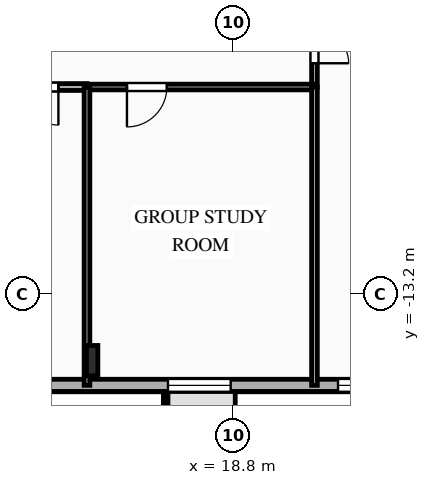
"""IFC4 building model, lengths in metres.
Left out: names, types, materials, properties, quantities, classifications, styles, units other than length and angle.
Written with IfcOpenShell. Run it as: python <this file> out.ifc"""

import sys

from ifc_helpers import new_model, si_unit, direction, frame, frame_2d, origin, origin_2d, place, context, subcontext, project, spatial, rectangle, i_section, extrude, element, fill, save


model = new_model("IFC4")
c1 = context("Model", 3, precision=1e-05, world=origin(), true_north=direction((0.0, 1.0)))
c2 = subcontext(c1, "Body", "Model", "MODEL_VIEW")
j1 = project(units=[si_unit("LENGTHUNIT", "METRE"), si_unit("PLANEANGLEUNIT", "RADIAN")], contexts=[c1])
p1 = place(None, origin())
s1 = spatial("IfcSite", under=j1, at=p1, CompositionType="ELEMENT")
p2 = place(p1, origin())
s2 = spatial("IfcBuilding", under=s1, at=p2, CompositionType="ELEMENT")
p3 = place(p2, frame((0.0, 0.0, 154.45)))
s3 = spatial("IfcBuildingStorey", under=s2, at=p3, CompositionType="ELEMENT", Elevation=154.45)
p4 = place(p3, frame((15.1, -14.95, 0.0), z_axis=(0.0, 0.0, 1.0), x_axis=(1.0, 0.0, 0.0)))
e1 = element("IfcColumn", 1, at=p4, inside=s3, PredefinedType="COLUMN", context=c2, shape_type="SweptSolid", body=[
    extrude(i_section(OverallWidth=0.3, OverallDepth=0.8, WebThickness=0.018, FlangeThickness=0.033, FilletRadius=0.03, at=origin_2d()), origin(), (0.0, 0.0, 1.0), 3.35),
])
p5 = place(p3, frame((23.8, -15.6, 0.0), z_axis=(0.0, 0.0, 1.0), x_axis=(-1.0, 0.0, 0.0)))
e2 = element("IfcWall", 2, at=p5, inside=s3, PredefinedType="SOLIDWALL", context=c2, shape_type="SweptSolid", body=[
    extrude(rectangle(XDim=49.6, YDim=0.32, at=frame_2d((24.8, 0.0))), origin(), (0.0, 0.0, 1.0), 3.04),
])
p6 = place(p5, frame((1.13, 0.0, 0.85)))
e3 = element("IfcOpeningElement", 3, at=p6, cuts=e2, PredefinedType="OPENING", context=c2, shape_type="SweptSolid", body=[
    extrude(rectangle(XDim=1.1, YDim=1.85, at=frame_2d((0.55, 0.925))), frame((0.0, 0.17, 0.0), z_axis=(0.0, -1.0, 0.0), x_axis=(1.0, 0.0, 0.0)), (0.0, 0.0, 1.0), 0.34),
])
p7 = place(p5, frame((5.055, 0.0, 0.85)))
e4 = element("IfcOpeningElement", 4, at=p7, cuts=e2, PredefinedType="OPENING", context=c2, shape_type="SweptSolid", body=[
    extrude(rectangle(XDim=1.65, YDim=1.85, at=frame_2d((0.825, 0.925))), frame((0.0, 0.17, 0.0), z_axis=(0.0, -1.0, 0.0), x_axis=(1.0, 0.0, 0.0)), (0.0, 0.0, 1.0), 0.34),
])
p8 = place(p5, frame((10.78, 0.0, 0.85)))
e5 = element("IfcOpeningElement", 5, at=p8, cuts=e2, PredefinedType="OPENING", context=c2, shape_type="SweptSolid", body=[
    extrude(rectangle(XDim=2.2, YDim=1.85, at=frame_2d((1.1, 0.925))), frame((0.0, 0.17, 0.0), z_axis=(0.0, -1.0, 0.0), x_axis=(1.0, 0.0, 0.0)), (0.0, 0.0, 1.0), 0.34),
])
p9 = place(p5, frame((17.284, 0.0, 0.85)))
e6 = element("IfcOpeningElement", 6, at=p9, cuts=e2, PredefinedType="OPENING", context=c2, shape_type="SweptSolid", body=[
    extrude(rectangle(XDim=2.2, YDim=1.85, at=frame_2d((1.1, 0.925))), frame((0.0, 0.17, 0.0), z_axis=(0.0, -1.0, 0.0), x_axis=(1.0, 0.0, 0.0)), (0.0, 0.0, 1.0), 0.34),
])
p10 = place(p5, frame((22.248, 0.0, 0.85)))
e7 = element("IfcOpeningElement", 7, at=p10, cuts=e2, PredefinedType="OPENING", context=c2, shape_type="SweptSolid", body=[
    extrude(rectangle(XDim=2.2, YDim=1.85, at=frame_2d((1.1, 0.925))), frame((0.0, 0.17, 0.0), z_axis=(0.0, -1.0, 0.0), x_axis=(1.0, 0.0, 0.0)), (0.0, 0.0, 1.0), 0.34),
])
p11 = place(p5, frame((28.7, 0.0, 0.85)))
e8 = element("IfcOpeningElement", 8, at=p11, cuts=e2, PredefinedType="OPENING", context=c2, shape_type="SweptSolid", body=[
    extrude(rectangle(XDim=2.2, YDim=1.85, at=frame_2d((1.1, 0.925))), frame((0.0, 0.17, 0.0), z_axis=(0.0, -1.0, 0.0), x_axis=(1.0, 0.0, 0.0)), (0.0, 0.0, 1.0), 0.34),
])
p12 = place(p5, frame((34.7, 0.0, 0.85)))
e9 = element("IfcOpeningElement", 9, at=p12, cuts=e2, PredefinedType="OPENING", context=c2, shape_type="SweptSolid", body=[
    extrude(rectangle(XDim=2.2, YDim=1.85, at=frame_2d((1.1, 0.925))), frame((0.0, 0.17, 0.0), z_axis=(0.0, -1.0, 0.0), x_axis=(1.0, 0.0, 0.0)), (0.0, 0.0, 1.0), 0.34),
])
p13 = place(p5, frame((41.492, 0.0, 0.85)))
e10 = element("IfcOpeningElement", 10, at=p13, cuts=e2, PredefinedType="OPENING", context=c2, shape_type="SweptSolid", body=[
    extrude(rectangle(XDim=1.65, YDim=1.85, at=frame_2d((0.825, 0.925))), frame((0.0, 0.17, 0.0), z_axis=(0.0, -1.0, 0.0), x_axis=(1.0, 0.0, 0.0)), (0.0, 0.0, 1.0), 0.34),
])
p14 = place(p5, frame((46.175, 0.0, 0.85)))
e11 = element("IfcOpeningElement", 11, at=p14, cuts=e2, PredefinedType="OPENING", context=c2, shape_type="SweptSolid", body=[
    extrude(rectangle(XDim=1.65, YDim=1.85, at=frame_2d((0.825, 0.925))), frame((0.0, 0.17, 0.0), z_axis=(0.0, -1.0, 0.0), x_axis=(1.0, 0.0, 0.0)), (0.0, 0.0, 1.0), 0.34),
])
p15 = place(p3, frame((20.95, -5.6, 0.0), z_axis=(0.0, 0.0, 1.0), x_axis=(0.0, -1.0, 0.0)))
e12 = element("IfcWall", 12, at=p15, inside=s3, PredefinedType="PARTITIONING", context=c2, shape_type="SweptSolid", body=[
    extrude(rectangle(XDim=2.15, YDim=0.15, at=frame_2d((1.075, 0.0))), origin(), (0.0, 0.0, 1.0), 3.04),
])
p16 = place(p15, frame((0.625, 0.0, 0.0)))
e13 = element("IfcOpeningElement", 13, at=p16, cuts=e12, PredefinedType="OPENING", context=c2, shape_type="SweptSolid", body=[
    extrude(rectangle(XDim=0.9, YDim=2.1, at=frame_2d((0.45, 1.05))), frame((0.0, 0.085, 0.0), z_axis=(0.0, -1.0, 0.0), x_axis=(1.0, 0.0, 0.0)), (0.0, 0.0, 1.0), 0.17),
])
p17 = place(p3, frame((14.964, -7.75, 0.0), z_axis=(0.0, 0.0, 1.0), x_axis=(-1.0, 0.0, 0.0)))
e14 = element("IfcWall", 14, at=p17, inside=s3, PredefinedType="PARTITIONING", context=c2, shape_type="SweptSolid", body=[
    extrude(rectangle(XDim=3.535, YDim=0.18, at=frame_2d((1.768, 0.0))), origin(), (0.0, 0.0, 1.0), 3.04),
])
p18 = place(p17, frame((0.752, 0.0, 0.0)))
e15 = element("IfcOpeningElement", 15, at=p18, cuts=e14, PredefinedType="OPENING", context=c2, shape_type="SweptSolid", body=[
    extrude(rectangle(XDim=1.0, YDim=2.15, at=frame_2d((0.5, 1.075))), frame((0.0, 0.1, 0.0), z_axis=(0.0, -1.0, 0.0), x_axis=(1.0, 0.0, 0.0)), (0.0, 0.0, 1.0), 0.2),
])
p19 = place(p3, frame((20.95, -7.75, 0.0), z_axis=(0.0, 0.0, 1.0), x_axis=(-1.0, 0.0, 0.0)))
e16 = element("IfcWall", 16, at=p19, inside=s3, PredefinedType="PARTITIONING", context=c2, shape_type="SweptSolid", body=[
    extrude(rectangle(XDim=5.986, YDim=0.15, at=frame_2d((2.993, 0.0))), origin(), (0.0, 0.0, 1.0), 3.04),
])
p20 = place(p19, frame((3.884, 0.0, 0.0)))
e17 = element("IfcOpeningElement", 17, at=p20, cuts=e16, PredefinedType="OPENING", context=c2, shape_type="SweptSolid", body=[
    extrude(rectangle(XDim=1.05, YDim=2.15, at=frame_2d((0.525, 1.075))), frame((0.0, 0.085, 0.0), z_axis=(0.0, -1.0, 0.0), x_axis=(1.0, 0.0, 0.0)), (0.0, 0.0, 1.0), 0.17),
])
for number, where, z_axis, x_axis in (
    (18, (20.95, -15.6, 0.0), (0.0, 0.0, 1.0), (0.0, 1.0, 0.0)),
    (19, (14.964, -7.75, 0.0), (0.0, 0.0, 1.0), (0.0, -1.0, 0.0)),
):
    element("IfcWall", number, at=place(p3, frame(where, z_axis=z_axis, x_axis=x_axis)), inside=s3, PredefinedType="PARTITIONING", context=c2, shape_type="SweptSolid", body=[
        extrude(rectangle(XDim=7.85, YDim=0.15, at=frame_2d((3.925, 0.0))), origin(), (0.0, 0.0, 1.0), 3.04),
    ])
p21 = place(p6, origin())
e20 = element("IfcWindow", 20, at=p21, inside=s3, PartitioningType="SINGLE_PANEL", PredefinedType="WINDOW", context=c2, shape_type="SweptSolid", body=[
    extrude(rectangle(XDim=1.1, YDim=1.85, at=frame_2d((0.55, 0.925))), frame((0.0, 0.03, 0.0), z_axis=(0.0, -1.0, 0.0), x_axis=(1.0, 0.0, 0.0)), (0.0, 0.0, 1.0), 0.06),
])
fill(e3, e20)
p22 = place(p7, origin())
e21 = element("IfcWindow", 21, at=p22, inside=s3, PartitioningType="SINGLE_PANEL", PredefinedType="WINDOW", context=c2, shape_type="SweptSolid", body=[
    extrude(rectangle(XDim=1.65, YDim=1.85, at=frame_2d((0.825, 0.925))), frame((0.0, 0.03, 0.0), z_axis=(0.0, -1.0, 0.0), x_axis=(1.0, 0.0, 0.0)), (0.0, 0.0, 1.0), 0.06),
])
fill(e4, e21)
p23 = place(p16, origin())
e22 = element("IfcDoor", 22, at=p23, inside=s3, OperationType="SINGLE_SWING_RIGHT", PredefinedType="DOOR", context=c2, shape_type="SweptSolid", body=[
    extrude(rectangle(XDim=0.9, YDim=2.1, at=frame_2d((0.45, 1.05))), frame((0.0, 0.025, 0.0), z_axis=(0.0, -1.0, 0.0), x_axis=(1.0, 0.0, 0.0)), (0.0, 0.0, 1.0), 0.05),
])
fill(e13, e22)
p24 = place(p18, origin())
e23 = element("IfcDoor", 23, at=p24, inside=s3, OperationType="SINGLE_SWING_LEFT", PredefinedType="DOOR", context=c2, shape_type="SweptSolid", body=[
    extrude(rectangle(XDim=1.0, YDim=2.15, at=frame_2d((0.5, 1.075))), frame((0.0, 0.025, 0.0), z_axis=(0.0, -1.0, 0.0), x_axis=(1.0, 0.0, 0.0)), (0.0, 0.0, 1.0), 0.05),
])
fill(e15, e23)
p25 = place(p20, origin())
e24 = element("IfcDoor", 24, at=p25, inside=s3, OperationType="SINGLE_SWING_RIGHT", PredefinedType="DOOR", context=c2, shape_type="SweptSolid", body=[
    extrude(rectangle(XDim=1.05, YDim=2.15, at=frame_2d((0.525, 1.075))), frame((0.0, 0.025, 0.0), z_axis=(0.0, -1.0, 0.0), x_axis=(1.0, 0.0, 0.0)), (0.0, 0.0, 1.0), 0.05),
])
fill(e17, e24)
save(model, sys.argv[1])
